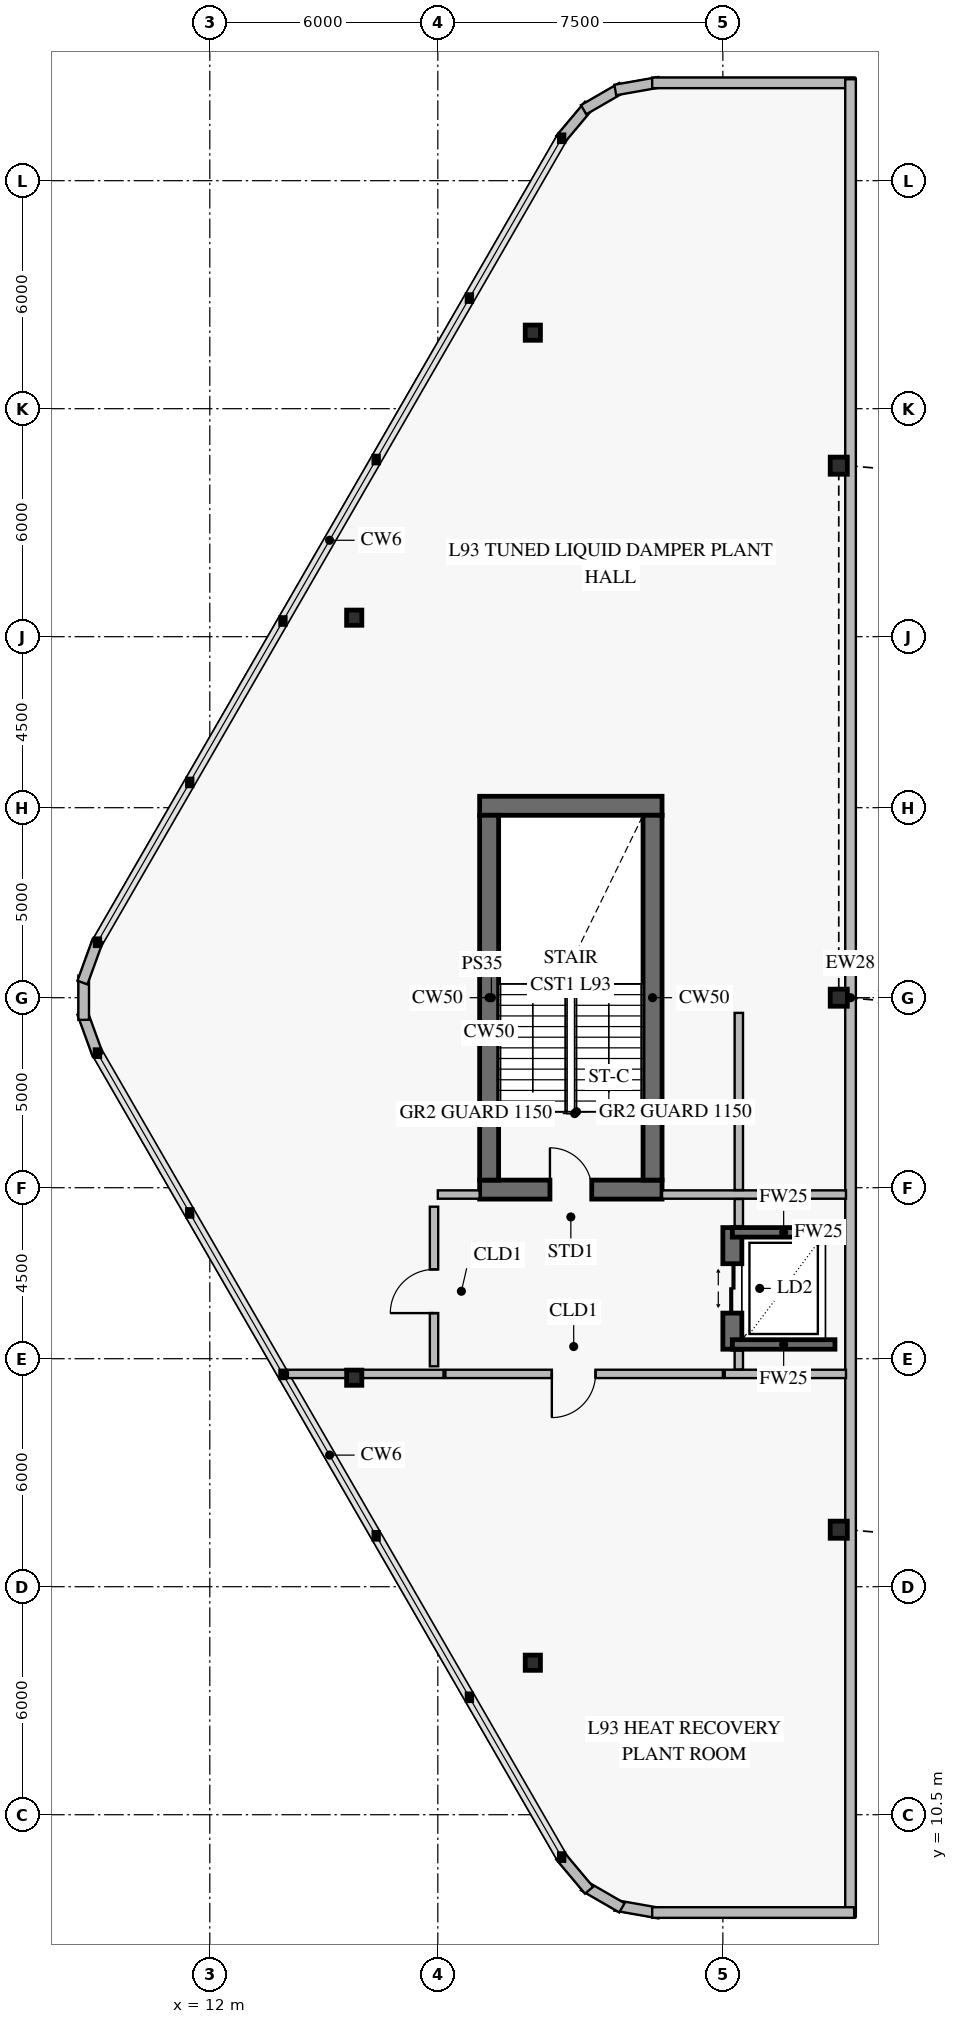
"""IFC4 building model, lengths in metres.
Left out: names, types, materials, properties, quantities, classifications, styles, units other than length and angle.
Written with IfcOpenShell. Run it as: python <this file> out.ifc"""

import sys

from ifc_helpers import new_model, si_unit, direction, frame, frame_2d, origin, origin_2d, place, context, subcontext, project, spatial, rectangle, hollow_rectangle, i_section, extrude, element, fill, save


model = new_model("IFC4")
c1 = context("Model", 3, precision=1e-05, world=origin(), true_north=direction((0.0, 1.0)))
c2 = subcontext(c1, "Body", "Model", "MODEL_VIEW")
j1 = project(units=[si_unit("LENGTHUNIT", "METRE"), si_unit("PLANEANGLEUNIT", "RADIAN")], contexts=[c1])
p1 = place(None, origin())
s1 = spatial("IfcSite", under=j1, at=p1, CompositionType="ELEMENT")
p2 = place(p1, origin())
s2 = spatial("IfcBuilding", under=s1, at=p2, CompositionType="ELEMENT")
p3 = place(p2, frame((0.0, 0.0, 365.8)))
s3 = spatial("IfcBuildingStorey", under=s2, at=p3, CompositionType="ELEMENT", Elevation=365.8)
p4 = place(p3, frame((19.1, 26.95, 0.0), z_axis=(0.0, 0.0, 1.0), x_axis=(1.0, 0.0, 0.0)))
e1 = element("IfcWall", 1, at=p4, inside=s3, PredefinedType="SHEAR", context=c2, shape_type="SweptSolid", body=[
    extrude(rectangle(XDim=4.8, YDim=0.5, at=frame_2d((2.4, 0.0))), origin(), (0.0, 0.0, 1.0), 4.4),
])
p5 = place(p4, frame((1.85, 0.0, 0.0)))
e2 = element("IfcOpeningElement", 2, at=p5, cuts=e1, PredefinedType="OPENING", context=c2, shape_type="SweptSolid", body=[
    extrude(rectangle(XDim=1.1, YDim=2.15, at=frame_2d((0.55, 1.075))), frame((0.0, 0.262, 0.0), z_axis=(0.0, -1.0, 0.0), x_axis=(1.0, 0.0, 0.0)), (0.0, 0.0, 1.0), 0.524),
])
p6 = place(p3, frame((23.9, 37.05, 0.0), z_axis=(0.0, 0.0, 1.0), x_axis=(-1.0, 0.0, 0.0)))
e3 = element("IfcWall", 3, at=p6, inside=s3, PredefinedType="SHEAR", context=c2, shape_type="SweptSolid", body=[
    extrude(rectangle(XDim=4.8, YDim=0.5, at=frame_2d((2.4, 0.0))), origin(), (0.0, 0.0, 1.0), 4.4),
])
for number, where, z_axis, x_axis in (
    (4, (19.35, 27.2, 0.0), (0.0, 0.0, 1.0), (0.0, 1.0, 0.0)),
    (5, (23.65, 36.8, 0.0), (0.0, 0.0, 1.0), (0.0, -1.0, 0.0)),
):
    element("IfcWall", number, at=place(p3, frame(where, z_axis=z_axis, x_axis=x_axis)), inside=s3, PredefinedType="SHEAR", context=c2, shape_type="SweptSolid", body=[
        extrude(rectangle(XDim=9.6, YDim=0.5, at=frame_2d((4.8, 0.0))), origin(), (0.0, 0.0, 1.0), 4.4),
    ])
p7 = place(p3, frame((25.75, 22.75, 0.0), z_axis=(0.0, 0.0, 1.0), x_axis=(0.0, 1.0, 0.0)))
e6 = element("IfcWall", 6, at=p7, inside=s3, PredefinedType="SHEAR", context=c2, shape_type="SweptSolid", body=[
    extrude(rectangle(XDim=3.2, YDim=0.5, at=frame_2d((1.6, 0.0))), origin(), (0.0, 0.0, 1.0), 4.4),
])
p8 = place(p7, frame((0.95, 0.0, 0.0)))
e7 = element("IfcOpeningElement", 7, at=p8, cuts=e6, PredefinedType="OPENING", context=c2, shape_type="SweptSolid", body=[
    extrude(rectangle(XDim=1.3, YDim=2.3, at=frame_2d((0.65, 1.15))), frame((0.0, 0.262, 0.0), z_axis=(0.0, -1.0, 0.0), x_axis=(1.0, 0.0, 0.0)), (0.0, 0.0, 1.0), 0.524),
])
for number, where, z_axis, x_axis in (
    (8, (15.8, 22.0, 0.0), (0.0, 0.0, 1.0), (1.0, 0.0, 0.0)),
    (9, (15.8, 42.0, 0.0), (0.0, 0.0, 1.0), (1.0, 0.0, 0.0)),
    (10, (20.5, 14.5, 0.0), (0.0, 0.0, 1.0), (1.0, 0.0, 0.0)),
    (11, (20.5, 49.5, 0.0), (0.0, 0.0, 1.0), (1.0, 0.0, 0.0)),
):
    element("IfcColumn", number, at=place(p3, frame(where, z_axis=z_axis, x_axis=x_axis)), inside=s3, PredefinedType="COLUMN", context=c2, shape_type="SweptSolid", body=[
        extrude(i_section(OverallWidth=0.4, OverallDepth=0.4, WebThickness=0.013, FlangeThickness=0.021, at=origin_2d()), origin(), (0.0, 0.0, 1.0), 4.05),
    ])
for number, where, z_axis, x_axis in (
    (12, (28.55, 18.0, 0.0), (0.0, 0.0, 1.0), (1.0, 0.0, 0.0)),
    (13, (28.55, 32.0, 0.0), (0.0, 0.0, 1.0), (1.0, 0.0, 0.0)),
    (14, (28.55, 46.0, 0.0), (0.0, 0.0, 1.0), (1.0, 0.0, 0.0)),
):
    element("IfcColumn", number, at=place(p3, frame(where, z_axis=z_axis, x_axis=x_axis)), inside=s3, PredefinedType="PILASTER", context=c2, shape_type="SweptSolid", body=[
        extrude(hollow_rectangle(XDim=0.45, YDim=0.45, WallThickness=0.022, at=origin_2d()), origin(), (0.0, 0.0, 1.0), 4.05),
    ])
p9 = place(p3, frame((23.829, 7.909, 0.0), z_axis=(0.0, 0.0, 1.0), x_axis=(-0.984798162481, 0.173702559495, 0.0)))
e15 = element("IfcWall", 15, at=p9, inside=s3, PredefinedType="SOLIDWALL", context=c2, shape_type="SweptSolid", body=[
    extrude(rectangle(XDim=1.178, YDim=0.28, at=frame_2d((0.589, 0.0))), origin(), (0.0, 0.0, 1.0), 4.05),
])
p10 = place(p3, frame((22.845, 8.05, 0.0), z_axis=(0.0, 0.0, 1.0), x_axis=(-0.865951785477, 0.500127488975, 0.0)))
e16 = element("IfcWall", 16, at=p10, inside=s3, PredefinedType="SOLIDWALL", context=c2, shape_type="SweptSolid", body=[
    extrude(rectangle(XDim=1.165, YDim=0.28, at=frame_2d((0.583, 0.0))), origin(), (0.0, 0.0, 1.0), 4.05),
])
for number, where, z_axis, x_axis in (
    (17, (21.979, 8.512, 0.0), (0.0, 0.0, 1.0), (-0.643, 0.766, 0.0)),
    (18, (9.052, 30.495, 0.0), (0.0, 0.0, 1.0), (-0.342, 0.94, 0.0)),
):
    element("IfcWall", number, at=place(p3, frame(where, z_axis=z_axis, x_axis=x_axis)), inside=s3, PredefinedType="SOLIDWALL", context=c2, shape_type="SweptSolid", body=[
        extrude(rectangle(XDim=1.178, YDim=0.28, at=frame_2d((0.589, 0.0))), origin(), (0.0, 0.0, 1.0), 4.05),
    ])
p11 = place(p3, frame((8.681, 31.417, 0.0), z_axis=(0.0, 0.0, 1.0), x_axis=(0.0, 1.0, 0.0)))
e19 = element("IfcWall", 19, at=p11, inside=s3, PredefinedType="SOLIDWALL", context=c2, shape_type="SweptSolid", body=[
    extrude(rectangle(XDim=1.165, YDim=0.28, at=frame_2d((0.583, 0.0))), origin(), (0.0, 0.0, 1.0), 4.05),
])
for number, where, z_axis, x_axis in (
    (20, (8.649, 32.398, 0.0), (0.0, 0.0, 1.0), (0.342, 0.94, 0.0)),
    (21, (21.222, 54.586, 0.0), (0.0, 0.0, 1.0), (0.643, 0.766, 0.0)),
):
    element("IfcWall", number, at=place(p3, frame(where, z_axis=z_axis, x_axis=x_axis)), inside=s3, PredefinedType="SOLIDWALL", context=c2, shape_type="SweptSolid", body=[
        extrude(rectangle(XDim=1.178, YDim=0.28, at=frame_2d((0.589, 0.0))), origin(), (0.0, 0.0, 1.0), 4.05),
    ])
p12 = place(p3, frame((21.836, 55.367, 0.0), z_axis=(0.0, 0.0, 1.0), x_axis=(0.865951785477, 0.500127488975, 0.0)))
e22 = element("IfcWall", 22, at=p12, inside=s3, PredefinedType="SOLIDWALL", context=c2, shape_type="SweptSolid", body=[
    extrude(rectangle(XDim=1.165, YDim=0.28, at=frame_2d((0.583, 0.0))), origin(), (0.0, 0.0, 1.0), 4.05),
])
p13 = place(p3, frame((22.669, 55.886, 0.0), z_axis=(0.0, 0.0, 1.0), x_axis=(0.984798162481, 0.173702559495, 0.0)))
e23 = element("IfcWall", 23, at=p13, inside=s3, PredefinedType="SOLIDWALL", context=c2, shape_type="SweptSolid", body=[
    extrude(rectangle(XDim=1.178, YDim=0.28, at=frame_2d((0.589, 0.0))), origin(), (0.0, 0.0, 1.0), 4.05),
])
p14 = place(p3, frame((23.64, 56.074, 0.0), z_axis=(0.0, 0.0, 1.0), x_axis=(1.0, 0.0, 0.0)))
e24 = element("IfcWall", 24, at=p14, inside=s3, PredefinedType="SOLIDWALL", context=c2, shape_type="SweptSolid", body=[
    extrude(rectangle(XDim=5.315, YDim=0.28, at=frame_2d((2.657, 0.0))), origin(), (0.0, 0.0, 1.0), 4.05),
])
p15 = place(p3, frame((28.86, 56.169, 0.0), z_axis=(0.0, 0.0, 1.0), x_axis=(0.0, -1.0, 0.0)))
e25 = element("IfcWall", 25, at=p15, inside=s3, PredefinedType="SOLIDWALL", context=c2, shape_type="SweptSolid", body=[
    extrude(rectangle(XDim=48.338, YDim=0.28, at=frame_2d((24.169, 0.0))), origin(), (0.0, 0.0, 1.0), 3.465),
])
p16 = place(p3, frame((28.955, 7.926, 0.0), z_axis=(0.0, 0.0, 1.0), x_axis=(-1.0, 0.0, 0.0)))
e26 = element("IfcWall", 26, at=p16, inside=s3, PredefinedType="SOLIDWALL", context=c2, shape_type="SweptSolid", body=[
    extrude(rectangle(XDim=5.315, YDim=0.28, at=frame_2d((2.657, 0.0))), origin(), (0.0, 0.0, 1.0), 4.05),
])
for number, where, z_axis, x_axis in (
    (27, (25.75, 25.825, 0.0), (0.0, 0.0, 1.0), (1.0, 0.0, 0.0)),
    (28, (25.75, 22.875, 0.0), (0.0, 0.0, 1.0), (1.0, 0.0, 0.0)),
):
    element("IfcWall", number, at=place(p3, frame(where, z_axis=z_axis, x_axis=x_axis)), inside=s3, PredefinedType="SOLIDWALL", context=c2, shape_type="SweptSolid", body=[
        extrude(rectangle(XDim=2.7, YDim=0.25, at=frame_2d((1.35, 0.0))), origin(), (0.0, 0.0, 1.0), 4.4),
    ])
p17 = place(p3, frame((18.2, 22.1, 0.0), z_axis=(0.0, 0.0, 1.0), x_axis=(1.0, 0.0, 0.0)))
e29 = element("IfcWall", 29, at=p17, inside=s3, PredefinedType="PARTITIONING", context=c2, shape_type="SweptSolid", body=[
    extrude(rectangle(XDim=7.3, YDim=0.22, at=frame_2d((3.65, 0.0))), origin(), (0.0, 0.0, 1.0), 4.05),
])
p18 = place(p17, frame((2.8, 0.0, 0.0)))
e30 = element("IfcOpeningElement", 30, at=p18, cuts=e29, PredefinedType="OPENING", context=c2, shape_type="SweptSolid", body=[
    extrude(rectangle(XDim=1.15, YDim=2.2, at=frame_2d((0.575, 1.1))), frame((0.0, 0.122, 0.0), z_axis=(0.0, -1.0, 0.0), x_axis=(1.0, 0.0, 0.0)), (0.0, 0.0, 1.0), 0.244),
])
p19 = place(p3, frame((17.9, 22.3, 0.0), z_axis=(0.0, 0.0, 1.0), x_axis=(0.0, 1.0, 0.0)))
e31 = element("IfcWall", 31, at=p19, inside=s3, PredefinedType="PARTITIONING", context=c2, shape_type="SweptSolid", body=[
    extrude(rectangle(XDim=4.2, YDim=0.22, at=frame_2d((2.1, 0.0))), origin(), (0.0, 0.0, 1.0), 4.05),
])
p20 = place(p19, frame((1.4, 0.0, 0.0)))
e32 = element("IfcOpeningElement", 32, at=p20, cuts=e31, PredefinedType="OPENING", context=c2, shape_type="SweptSolid", body=[
    extrude(rectangle(XDim=1.15, YDim=2.2, at=frame_2d((0.575, 1.1))), frame((0.0, 0.122, 0.0), z_axis=(0.0, -1.0, 0.0), x_axis=(1.0, 0.0, 0.0)), (0.0, 0.0, 1.0), 0.244),
])
p21 = place(p3, frame((14.056, 22.1, 0.0), z_axis=(0.0, 0.0, 1.0), x_axis=(1.0, 0.0, 0.0)))
e33 = element("IfcWall", 33, at=p21, inside=s3, PredefinedType="PARTITIONING", context=c2, shape_type="SweptSolid", body=[
    extrude(rectangle(XDim=4.094, YDim=0.22, at=frame_2d((2.047, 0.0))), origin(), (0.0, 0.0, 1.0), 3.47),
])
p22 = place(p3, frame((25.55, 22.1, 0.0), z_axis=(0.0, 0.0, 1.0), x_axis=(1.0, 0.0, 0.0)))
e34 = element("IfcWall", 34, at=p22, inside=s3, PredefinedType="PARTITIONING", context=c2, shape_type="SweptSolid", body=[
    extrude(rectangle(XDim=3.19, YDim=0.22, at=frame_2d((1.595, 0.0))), origin(), (0.0, 0.0, 1.0), 3.47),
])
p23 = place(p3, frame((28.74, 26.82, 0.0), z_axis=(0.0, 0.0, 1.0), x_axis=(-1.0, 0.0, 0.0)))
e35 = element("IfcWall", 35, at=p23, inside=s3, PredefinedType="PARTITIONING", context=c2, shape_type="SweptSolid", body=[
    extrude(rectangle(XDim=4.84, YDim=0.22, at=frame_2d((2.42, 0.0))), origin(), (0.0, 0.0, 1.0), 3.47),
])
p24 = place(p3, frame((19.1, 26.82, 0.0), z_axis=(0.0, 0.0, 1.0), x_axis=(-1.0, 0.0, 0.0)))
e36 = element("IfcWall", 36, at=p24, inside=s3, PredefinedType="PARTITIONING", context=c2, shape_type="SweptSolid", body=[
    extrude(rectangle(XDim=1.1, YDim=0.22, at=frame_2d((0.55, 0.0))), origin(), (0.0, 0.0, 1.0), 4.05),
])
p25 = place(p3, frame((25.92, 25.989, 0.0), z_axis=(0.0, 0.0, 1.0), x_axis=(0.0, 1.0, 0.0)))
e37 = element("IfcWall", 37, at=p25, inside=s3, PredefinedType="PARTITIONING", context=c2, shape_type="SweptSolid", body=[
    extrude(rectangle(XDim=0.713, YDim=0.22, at=frame_2d((0.356, 0.0))), origin(), (0.0, 0.0, 1.0), 4.05),
])
p26 = place(p3, frame((25.92, 26.938, 0.0), z_axis=(0.0, 0.0, 1.0), x_axis=(0.0, 1.0, 0.0)))
e38 = element("IfcWall", 38, at=p26, inside=s3, PredefinedType="PARTITIONING", context=c2, shape_type="SweptSolid", body=[
    extrude(rectangle(XDim=4.662, YDim=0.22, at=frame_2d((2.331, 0.0))), origin(), (0.0, 0.0, 1.0), 4.05),
])
p27 = place(p3, frame((25.92, 22.218, 0.0), z_axis=(0.0, 0.0, 1.0), x_axis=(0.0, 1.0, 0.0)))
e39 = element("IfcWall", 39, at=p27, inside=s3, PredefinedType="PARTITIONING", context=c2, shape_type="SweptSolid", body=[
    extrude(rectangle(XDim=0.493, YDim=0.22, at=frame_2d((0.247, 0.0))), origin(), (0.0, 0.0, 1.0), 4.05),
])
p28 = place(p8, origin())
e40 = element("IfcDoor", 40, at=p28, inside=s3, OperationType="DOUBLE_DOOR_SLIDING", PredefinedType="DOOR", context=c2, shape_type="SweptSolid", body=[
    extrude(rectangle(XDim=1.3, YDim=2.3, at=frame_2d((0.65, 1.15))), frame((0.0, 0.025, 0.0), z_axis=(0.0, -1.0, 0.0), x_axis=(1.0, 0.0, 0.0)), (0.0, 0.0, 1.0), 0.05),
])
fill(e7, e40)
p29 = place(p5, origin())
e41 = element("IfcDoor", 41, at=p29, inside=s3, OperationType="SINGLE_SWING_LEFT", PredefinedType="USERDEFINED", context=c2, shape_type="SweptSolid", body=[
    extrude(rectangle(XDim=1.1, YDim=2.15, at=frame_2d((0.55, 1.075))), frame((0.0, 0.025, 0.0), z_axis=(0.0, -1.0, 0.0), x_axis=(1.0, 0.0, 0.0)), (0.0, 0.0, 1.0), 0.05),
])
fill(e2, e41)
p30 = place(p18, frame((1.15, 0.0, 0.0), z_axis=(0.0, 0.0, 1.0), x_axis=(-1.0, 0.0, 0.0)))
e42 = element("IfcDoor", 42, at=p30, inside=s3, OperationType="SINGLE_SWING_RIGHT", PredefinedType="DOOR", context=c2, shape_type="SweptSolid", body=[
    extrude(rectangle(XDim=1.15, YDim=2.2, at=frame_2d((0.575, 1.1))), frame((0.0, 0.025, 0.0), z_axis=(0.0, -1.0, 0.0), x_axis=(1.0, 0.0, 0.0)), (0.0, 0.0, 1.0), 0.05),
])
fill(e30, e42)
p31 = place(p20, origin())
e43 = element("IfcDoor", 43, at=p31, inside=s3, OperationType="SINGLE_SWING_LEFT", PredefinedType="DOOR", context=c2, shape_type="SweptSolid", body=[
    extrude(rectangle(XDim=1.15, YDim=2.2, at=frame_2d((0.575, 1.1))), frame((0.0, 0.025, 0.0), z_axis=(0.0, -1.0, 0.0), x_axis=(1.0, 0.0, 0.0)), (0.0, 0.0, 1.0), 0.05),
])
fill(e32, e43)
save(model, sys.argv[1])
